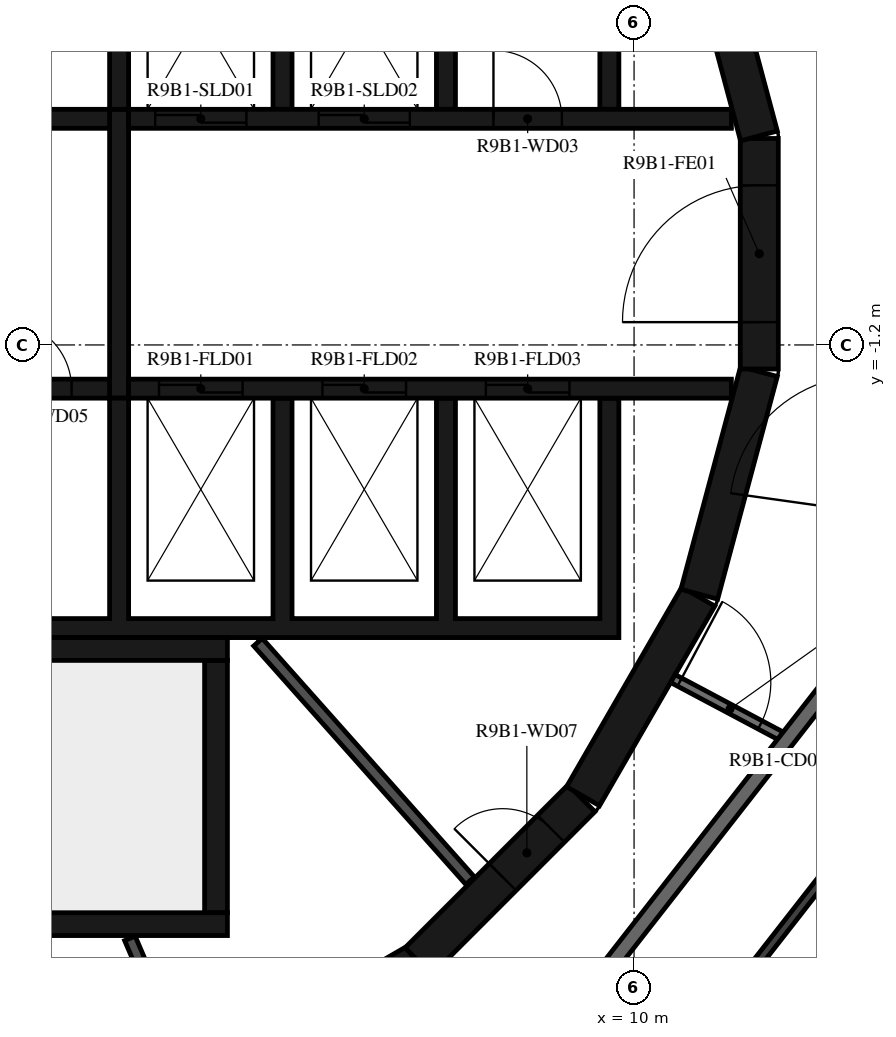
"""IFC4 building model, lengths in metres.
Left out: names, types, materials, properties, quantities, classifications, styles, units other than length and angle.
Written with IfcOpenShell. Run it as: python <this file> out.ifc"""

import sys

from ifc_helpers import new_model, si_unit, direction, frame, frame_2d, origin, place, context, subcontext, project, spatial, polyline, rectangle, outline, extrude, element, fill, save


model = new_model("IFC4")
c1 = context("Model", 3, precision=1e-05, world=origin(), true_north=direction((0.0, 1.0)))
c2 = subcontext(c1, "Body", "Model", "MODEL_VIEW")
j1 = project(units=[si_unit("LENGTHUNIT", "METRE"), si_unit("PLANEANGLEUNIT", "RADIAN")], contexts=[c1])
p1 = place(None, origin())
s1 = spatial("IfcSite", under=j1, at=p1, CompositionType="ELEMENT")
p2 = place(p1, origin())
s2 = spatial("IfcBuilding", under=s1, at=p2, CompositionType="ELEMENT")
p3 = place(p2, frame((0.0, 0.0, 343.5)))
s3 = spatial("IfcBuildingStorey", under=s2, at=p3, CompositionType="ELEMENT", Elevation=343.5)
p4 = place(p3, frame((12.221, -11.578, 0.0), z_axis=(0.0, 0.0, 1.0), x_axis=(0.615666248856, 0.788007024093, 0.0)))
e1 = element("IfcWall", 1, at=p4, inside=s3, PredefinedType="STANDARD", context=c2, shape_type="SweptSolid", body=[
    extrude(rectangle(XDim=3.2, YDim=0.16, at=frame_2d((1.6, 0.0))), origin(), (0.0, 0.0, 1.0), 3.12),
])
p5 = place(p4, frame((0.4, 0.0, 0.0)))
e2 = element("IfcOpeningElement", 2, at=p5, cuts=e1, PredefinedType="OPENING", context=c2, shape_type="SweptSolid", body=[
    extrude(rectangle(XDim=2.4, YDim=2.4, at=frame_2d((1.2, 1.2))), frame((0.0, 0.09, 0.0), z_axis=(0.0, -1.0, 0.0), x_axis=(1.0, 0.0, 0.0)), (0.0, 0.0, 1.0), 0.18),
])
p6 = place(p3, frame((4.51, -10.845, 0.0), z_axis=(0.0, 0.0, 1.0), x_axis=(0.865975092491, 0.500087131594, 0.0)))
e3 = element("IfcWall", 3, at=p6, inside=s3, PredefinedType="SHEAR", context=c2, shape_type="SweptSolid", body=[
    extrude(rectangle(XDim=3.033, YDim=0.5, at=frame_2d((1.516, 0.0))), origin(), (0.0, 0.0, 1.0), 3.12),
])
p7 = place(p6, frame((1.066, 0.0, 0.0)))
e4 = element("IfcOpeningElement", 4, at=p7, cuts=e3, PredefinedType="OPENING", context=c2, shape_type="SweptSolid", body=[
    extrude(rectangle(XDim=0.9, YDim=2.1, at=frame_2d((0.45, 1.05))), frame((0.0, 0.26, 0.0), z_axis=(0.0, -1.0, 0.0), x_axis=(1.0, 0.0, 0.0)), (0.0, 0.0, 1.0), 0.52),
])
p8 = place(p3, frame((7.164, -9.308, 0.0), z_axis=(0.0, 0.0, 1.0), x_axis=(0.707106781187, 0.707106781187, 0.0)))
e5 = element("IfcWall", 5, at=p8, inside=s3, PredefinedType="SHEAR", context=c2, shape_type="SweptSolid", body=[
    extrude(rectangle(XDim=3.032, YDim=0.5, at=frame_2d((1.516, 0.0))), origin(), (0.0, 0.0, 1.0), 3.12),
])
p9 = place(p8, frame((1.566, 0.0, 0.0)))
e6 = element("IfcOpeningElement", 6, at=p9, cuts=e5, PredefinedType="OPENING", context=c2, shape_type="SweptSolid", body=[
    extrude(rectangle(XDim=0.9, YDim=2.1, at=frame_2d((0.45, 1.05))), frame((0.0, 0.26, 0.0), z_axis=(0.0, -1.0, 0.0), x_axis=(1.0, 0.0, 0.0)), (0.0, 0.0, 1.0), 0.52),
])
for number, where, z_axis, x_axis in (
    (7, (9.329, -7.137, 0.0), (0.0, 0.0, 1.0), (0.5, 0.866, 0.0)),
    (8, (10.858, -4.479, 0.0), (0.0, 0.0, 1.0), (0.259, 0.966, 0.0)),
):
    element("IfcWall", number, at=place(p3, frame(where, z_axis=z_axis, x_axis=x_axis)), inside=s3, PredefinedType="SHEAR", context=c2, shape_type="SweptSolid", body=[
        extrude(rectangle(XDim=3.033, YDim=0.5, at=frame_2d((1.516, 0.0))), origin(), (0.0, 0.0, 1.0), 3.12),
    ])
p10 = place(p3, frame((11.647, -1.516, 0.0), z_axis=(0.0, 0.0, 1.0), x_axis=(0.0, 1.0, 0.0)))
e9 = element("IfcWall", 9, at=p10, inside=s3, PredefinedType="SHEAR", context=c2, shape_type="SweptSolid", body=[
    extrude(rectangle(XDim=3.033, YDim=0.5, at=frame_2d((1.516, 0.0))), origin(), (0.0, 0.0, 1.0), 3.12),
])
p11 = place(p10, frame((0.616, 0.0, 0.0)))
e10 = element("IfcOpeningElement", 10, at=p11, cuts=e9, PredefinedType="OPENING", context=c2, shape_type="SweptSolid", body=[
    extrude(rectangle(XDim=1.8, YDim=2.1, at=frame_2d((0.9, 1.05))), frame((0.0, 0.26, 0.0), z_axis=(0.0, -1.0, 0.0), x_axis=(1.0, 0.0, 0.0)), (0.0, 0.0, 1.0), 0.52),
])
p12 = place(p3, frame((11.643, 1.55, 0.0), z_axis=(0.0, 0.0, 1.0), x_axis=(-0.258734743916, 0.965948410781, 0.0)))
e11 = element("IfcWall", 11, at=p12, inside=s3, PredefinedType="SHEAR", context=c2, shape_type="SweptSolid", body=[
    extrude(rectangle(XDim=3.033, YDim=0.5, at=frame_2d((1.516, 0.0))), origin(), (0.0, 0.0, 1.0), 3.12),
])
p13 = place(p3, frame((-2.4, -5.2, 0.0), z_axis=(0.0, 0.0, 1.0), x_axis=(1.0, 0.0, 0.0)))
e12 = element("IfcWall", 12, at=p13, inside=s3, PredefinedType="SHEAR", context=c2, shape_type="SweptSolid", body=[
    extrude(rectangle(XDim=7.05, YDim=0.3, at=frame_2d((3.525, 0.0))), origin(), (0.0, 0.0, 1.0), 3.12),
])
p14 = place(p3, frame((4.5, -8.67, 0.0), z_axis=(0.0, 0.0, 1.0), x_axis=(0.0, 1.0, 0.0)))
e13 = element("IfcWall", 13, at=p14, inside=s3, PredefinedType="SHEAR", context=c2, shape_type="SweptSolid", body=[
    extrude(rectangle(XDim=3.32, YDim=0.3, at=frame_2d((1.66, 0.0))), origin(), (0.0, 0.0, 1.0), 3.12),
])
p15 = place(p3, frame((0.1, -8.82, 0.0), z_axis=(0.0, 0.0, 1.0), x_axis=(1.0, 0.0, 0.0)))
e14 = element("IfcWall", 14, at=p15, inside=s3, PredefinedType="SHEAR", context=c2, shape_type="SweptSolid", body=[
    extrude(rectangle(XDim=4.55, YDim=0.3, at=frame_2d((2.275, 0.0))), origin(), (0.0, 0.0, 1.0), 3.12),
])
p16 = place(p3, origin())
e15 = element("IfcWall", 15, at=p16, inside=s3, PredefinedType="SHEAR", context=c2, shape_type="SweptSolid", body=[
    extrude(outline(polyline([(-9.8, 1.9), (-9.55, 1.9), (-9.55, 4.8), (-1.2, 4.8), (-1.2, 1.9), (-0.95, 1.9), (-0.95, 4.8), (3.1, 4.8), (3.1, 1.9), (3.35, 1.9), (3.35, 4.8), (5.25, 4.8), (5.25, 1.9), (5.5, 1.9), (5.5, 4.8), (7.4, 4.8), (7.4, 1.9), (7.65, 1.9), (7.65, 4.8), (9.55, 4.8), (9.55, 1.9), (9.8, 1.9), (9.8, 4.8), (9.8, 5.05), (-9.8, 5.05), (-9.8, 4.8), (-9.8, 1.9)])), origin(), (0.0, 0.0, 1.0), 3.12),
])
p17 = place(p3, origin())
e16 = element("IfcWall", 16, at=p17, inside=s3, PredefinedType="SHEAR", context=c2, shape_type="SweptSolid", body=[
    extrude(outline(polyline([(9.8, -5.05), (9.8, -4.8), (9.8, -1.9), (9.55, -1.9), (9.55, -4.8), (7.65, -4.8), (7.65, -1.9), (7.4, -1.9), (7.4, -4.8), (5.5, -4.8), (5.5, -1.9), (5.25, -1.9), (5.25, -4.8), (3.35, -4.8), (3.35, -1.9), (3.1, -1.9), (3.1, -4.8), (1.2, -4.8), (1.2, -1.9), (0.95, -1.9), (0.95, -4.8), (-0.95, -4.8), (-0.95, -1.9), (-1.2, -1.9), (-1.2, -4.8), (-3.1, -4.8), (-3.1, -1.9), (-3.35, -1.9), (-3.35, -4.8), (-5.25, -4.8), (-5.25, -1.9), (-5.5, -1.9), (-5.5, -4.8), (-9.55, -4.8), (-9.55, -1.9), (-9.8, -1.9), (-9.8, -4.8), (-9.8, -5.05), (9.8, -5.05)])), origin(), (0.0, 0.0, 1.0), 3.12),
])
p18 = place(p3, frame((-11.28, 1.775, 0.0), z_axis=(0.0, 0.0, 1.0), x_axis=(1.0, 0.0, 0.0)))
e17 = element("IfcWall", 17, at=p18, inside=s3, PredefinedType="SHEAR", context=c2, shape_type="SweptSolid", body=[
    extrude(rectangle(XDim=14.38, YDim=0.25, at=frame_2d((7.19, 0.0))), origin(), (0.0, 0.0, 1.0), 3.12),
])
p19 = place(p18, frame((5.455, 0.0, 0.0)))
e18 = element("IfcOpeningElement", 18, at=p19, cuts=e17, PredefinedType="OPENING", context=c2, shape_type="SweptSolid", body=[
    extrude(rectangle(XDim=0.9, YDim=2.1, at=frame_2d((0.45, 1.05))), frame((0.0, 0.135, 0.0), z_axis=(0.0, -1.0, 0.0), x_axis=(1.0, 0.0, 0.0)), (0.0, 0.0, 1.0), 0.27),
])
p20 = place(p18, frame((11.905, 0.0, 0.0)))
e19 = element("IfcOpeningElement", 19, at=p20, cuts=e17, PredefinedType="OPENING", context=c2, shape_type="SweptSolid", body=[
    extrude(rectangle(XDim=0.9, YDim=2.1, at=frame_2d((0.45, 1.05))), frame((0.0, 0.135, 0.0), z_axis=(0.0, -1.0, 0.0), x_axis=(1.0, 0.0, 0.0)), (0.0, 0.0, 1.0), 0.27),
])
p21 = place(p3, frame((3.35, 1.775, 0.0), z_axis=(0.0, 0.0, 1.0), x_axis=(1.0, 0.0, 0.0)))
e20 = element("IfcWall", 20, at=p21, inside=s3, PredefinedType="SHEAR", context=c2, shape_type="SweptSolid", body=[
    extrude(rectangle(XDim=7.93, YDim=0.25, at=frame_2d((3.965, 0.0))), origin(), (0.0, 0.0, 1.0), 3.12),
])
p22 = place(p21, frame((0.35, 0.0, 0.0)))
e21 = element("IfcOpeningElement", 21, at=p22, cuts=e20, PredefinedType="OPENING", context=c2, shape_type="SweptSolid", body=[
    extrude(rectangle(XDim=1.2, YDim=2.4, at=frame_2d((0.6, 1.2))), frame((0.0, 0.135, 0.0), z_axis=(0.0, -1.0, 0.0), x_axis=(1.0, 0.0, 0.0)), (0.0, 0.0, 1.0), 0.27),
])
p23 = place(p21, frame((2.5, 0.0, 0.0)))
e22 = element("IfcOpeningElement", 22, at=p23, cuts=e20, PredefinedType="OPENING", context=c2, shape_type="SweptSolid", body=[
    extrude(rectangle(XDim=1.2, YDim=2.4, at=frame_2d((0.6, 1.2))), frame((0.0, 0.135, 0.0), z_axis=(0.0, -1.0, 0.0), x_axis=(1.0, 0.0, 0.0)), (0.0, 0.0, 1.0), 0.27),
])
p24 = place(p21, frame((4.8, 0.0, 0.0)))
e23 = element("IfcOpeningElement", 23, at=p24, cuts=e20, PredefinedType="OPENING", context=c2, shape_type="SweptSolid", body=[
    extrude(rectangle(XDim=0.9, YDim=2.1, at=frame_2d((0.45, 1.05))), frame((0.0, 0.135, 0.0), z_axis=(0.0, -1.0, 0.0), x_axis=(1.0, 0.0, 0.0)), (0.0, 0.0, 1.0), 0.27),
])
p25 = place(p3, frame((-11.28, -1.775, 0.0), z_axis=(0.0, 0.0, 1.0), x_axis=(1.0, 0.0, 0.0)))
e24 = element("IfcWall", 24, at=p25, inside=s3, PredefinedType="SHEAR", context=c2, shape_type="SweptSolid", body=[
    extrude(rectangle(XDim=14.38, YDim=0.25, at=frame_2d((7.19, 0.0))), origin(), (0.0, 0.0, 1.0), 3.12),
])
p26 = place(p25, frame((6.43, 0.0, 0.0)))
e25 = element("IfcOpeningElement", 25, at=p26, cuts=e24, PredefinedType="OPENING", context=c2, shape_type="SweptSolid", body=[
    extrude(rectangle(XDim=1.1, YDim=2.1, at=frame_2d((0.55, 1.05))), frame((0.0, 0.135, 0.0), z_axis=(0.0, -1.0, 0.0), x_axis=(1.0, 0.0, 0.0)), (0.0, 0.0, 1.0), 0.27),
])
p27 = place(p25, frame((8.58, 0.0, 0.0)))
e26 = element("IfcOpeningElement", 26, at=p27, cuts=e24, PredefinedType="OPENING", context=c2, shape_type="SweptSolid", body=[
    extrude(rectangle(XDim=1.1, YDim=2.1, at=frame_2d((0.55, 1.05))), frame((0.0, 0.135, 0.0), z_axis=(0.0, -1.0, 0.0), x_axis=(1.0, 0.0, 0.0)), (0.0, 0.0, 1.0), 0.27),
])
p28 = place(p25, frame((10.73, 0.0, 0.0)))
e27 = element("IfcOpeningElement", 27, at=p28, cuts=e24, PredefinedType="OPENING", context=c2, shape_type="SweptSolid", body=[
    extrude(rectangle(XDim=1.1, YDim=2.1, at=frame_2d((0.55, 1.05))), frame((0.0, 0.135, 0.0), z_axis=(0.0, -1.0, 0.0), x_axis=(1.0, 0.0, 0.0)), (0.0, 0.0, 1.0), 0.27),
])
p29 = place(p25, frame((3.305, 0.0, 0.0)))
e28 = element("IfcOpeningElement", 28, at=p29, cuts=e24, PredefinedType="OPENING", context=c2, shape_type="SweptSolid", body=[
    extrude(rectangle(XDim=0.9, YDim=2.1, at=frame_2d((0.45, 1.05))), frame((0.0, 0.135, 0.0), z_axis=(0.0, -1.0, 0.0), x_axis=(1.0, 0.0, 0.0)), (0.0, 0.0, 1.0), 0.27),
])
p30 = place(p25, frame((12.98, 0.0, 0.0)))
e29 = element("IfcOpeningElement", 29, at=p30, cuts=e24, PredefinedType="OPENING", context=c2, shape_type="SweptSolid", body=[
    extrude(rectangle(XDim=0.9, YDim=2.1, at=frame_2d((0.45, 1.05))), frame((0.0, 0.135, 0.0), z_axis=(0.0, -1.0, 0.0), x_axis=(1.0, 0.0, 0.0)), (0.0, 0.0, 1.0), 0.27),
])
p31 = place(p3, frame((3.35, -1.775, 0.0), z_axis=(0.0, 0.0, 1.0), x_axis=(1.0, 0.0, 0.0)))
e30 = element("IfcWall", 30, at=p31, inside=s3, PredefinedType="SHEAR", context=c2, shape_type="SweptSolid", body=[
    extrude(rectangle(XDim=7.93, YDim=0.25, at=frame_2d((3.965, 0.0))), origin(), (0.0, 0.0, 1.0), 3.12),
])
p32 = place(p31, frame((0.4, 0.0, 0.0)))
e31 = element("IfcOpeningElement", 31, at=p32, cuts=e30, PredefinedType="OPENING", context=c2, shape_type="SweptSolid", body=[
    extrude(rectangle(XDim=1.1, YDim=2.4, at=frame_2d((0.55, 1.2))), frame((0.0, 0.135, 0.0), z_axis=(0.0, -1.0, 0.0), x_axis=(1.0, 0.0, 0.0)), (0.0, 0.0, 1.0), 0.27),
])
p33 = place(p31, frame((2.55, 0.0, 0.0)))
e32 = element("IfcOpeningElement", 32, at=p33, cuts=e30, PredefinedType="OPENING", context=c2, shape_type="SweptSolid", body=[
    extrude(rectangle(XDim=1.1, YDim=2.4, at=frame_2d((0.55, 1.2))), frame((0.0, 0.135, 0.0), z_axis=(0.0, -1.0, 0.0), x_axis=(1.0, 0.0, 0.0)), (0.0, 0.0, 1.0), 0.27),
])
p34 = place(p31, frame((4.7, 0.0, 0.0)))
e33 = element("IfcOpeningElement", 33, at=p34, cuts=e30, PredefinedType="OPENING", context=c2, shape_type="SweptSolid", body=[
    extrude(rectangle(XDim=1.1, YDim=2.4, at=frame_2d((0.55, 1.2))), frame((0.0, 0.135, 0.0), z_axis=(0.0, -1.0, 0.0), x_axis=(1.0, 0.0, 0.0)), (0.0, 0.0, 1.0), 0.27),
])
p35 = place(p3, frame((3.225, -1.9, 0.0), z_axis=(0.0, 0.0, 1.0), x_axis=(0.0, 1.0, 0.0)))
e34 = element("IfcWall", 34, at=p35, inside=s3, PredefinedType="SHEAR", context=c2, shape_type="SweptSolid", body=[
    extrude(rectangle(XDim=3.8, YDim=0.25, at=frame_2d((1.9, 0.0))), origin(), (0.0, 0.0, 1.0), 3.12),
])
p36 = place(p3, frame((7.842, -8.248, 0.0), z_axis=(0.0, 0.0, 1.0), x_axis=(-0.66446128181, 0.747322691329, 0.0)))
e35 = element("IfcWall", 35, at=p36, inside=s3, PredefinedType="PARTITIONING", context=c2, shape_type="SweptSolid", body=[
    extrude(rectangle(XDim=4.198, YDim=0.15, at=frame_2d((2.099, 0.0))), origin(), (0.0, 0.0, 1.0), 3.12),
])
p37 = place(p3, frame((3.367, -9.007, 0.0), z_axis=(0.0, 0.0, 1.0), x_axis=(0.394387482265, -0.918944238696, 0.0)))
e36 = element("IfcWall", 36, at=p37, inside=s3, PredefinedType="PARTITIONING", context=c2, shape_type="SweptSolid", body=[
    extrude(rectangle(XDim=1.825, YDim=0.15, at=frame_2d((0.913, 0.0))), origin(), (0.0, 0.0, 1.0), 3.12),
])
p38 = place(p3, frame((10.511, -5.589, 0.0), z_axis=(0.0, 0.0, 1.0), x_axis=(0.882959677414, -0.469448834337, 0.0)))
e37 = element("IfcWall", 37, at=p38, inside=s3, PredefinedType="PARTITIONING", context=c2, shape_type="SweptSolid", body=[
    extrude(rectangle(XDim=1.702, YDim=0.12, at=frame_2d((0.851, 0.0))), origin(), (0.0, 0.0, 1.0), 3.12),
])
p39 = place(p38, frame((0.1, 0.0, 0.0)))
e38 = element("IfcOpeningElement", 38, at=p39, cuts=e37, PredefinedType="OPENING", context=c2, shape_type="SweptSolid", body=[
    extrude(rectangle(XDim=1.2, YDim=2.1, at=frame_2d((0.6, 1.05))), frame((0.0, 0.07, 0.0), z_axis=(0.0, -1.0, 0.0), x_axis=(1.0, 0.0, 0.0)), (0.0, 0.0, 1.0), 0.14),
])
p40 = place(p3, frame((13.769, 1.691, 0.0), z_axis=(0.0, 0.0, 1.0), x_axis=(-0.374618189599, 0.92717916932, 0.0)))
e39 = element("IfcWall", 39, at=p40, inside=s3, PredefinedType="STANDARD", context=c2, shape_type="SweptSolid", body=[
    extrude(rectangle(XDim=7.181, YDim=0.2, at=frame_2d((3.591, 0.0))), origin(), (0.0, 0.0, 1.0), 3.12),
])
p41 = place(p40, frame((2.371, 0.0, 0.0)))
e40 = element("IfcOpeningElement", 40, at=p41, cuts=e39, PredefinedType="OPENING", context=c2, shape_type="SweptSolid", body=[
    extrude(rectangle(XDim=1.0, YDim=2.1, at=frame_2d((0.5, 1.05))), frame((0.0, 0.11, 0.0), z_axis=(0.0, -1.0, 0.0), x_axis=(1.0, 0.0, 0.0)), (0.0, 0.0, 1.0), 0.22),
])
p42 = place(p3, frame((8.349, -11.079, 0.0), z_axis=(0.0, 0.0, 1.0), x_axis=(0.615669112324, 0.78800478687, 0.0)))
e41 = element("IfcWall", 41, at=p42, inside=s3, PredefinedType="STANDARD", context=c2, shape_type="SweptSolid", body=[
    extrude(rectangle(XDim=7.181, YDim=0.2, at=frame_2d((3.591, 0.0))), origin(), (0.0, 0.0, 1.0), 3.12),
])
p43 = place(p3, frame((9.351, -12.233, 0.0), z_axis=(0.0, 0.0, 1.0), x_axis=(0.615678207218, 0.787997680933, 0.0)))
e42 = element("IfcWall", 42, at=p43, inside=s3, PredefinedType="PARTITIONING", context=c2, shape_type="SweptSolid", body=[
    extrude(rectangle(XDim=7.765, YDim=0.12, at=frame_2d((3.883, 0.0))), origin(), (0.0, 0.0, 1.0), 3.12),
])
p44 = place(p43, frame((0.2, 0.0, 0.0)))
e43 = element("IfcOpeningElement", 43, at=p44, cuts=e42, PredefinedType="OPENING", context=c2, shape_type="SweptSolid", body=[
    extrude(rectangle(XDim=0.9, YDim=2.1, at=frame_2d((0.45, 1.05))), frame((0.0, 0.07, 0.0), z_axis=(0.0, -1.0, 0.0), x_axis=(1.0, 0.0, 0.0)), (0.0, 0.0, 1.0), 0.14),
])
p45 = place(p11, origin())
e44 = element("IfcDoor", 44, at=p45, inside=s3, OperationType="DOUBLE_DOOR_SINGLE_SWING", PredefinedType="DOOR", context=c2, shape_type="SweptSolid", body=[
    extrude(rectangle(XDim=1.8, YDim=2.1, at=frame_2d((0.9, 1.05))), frame((0.0, 0.025, 0.0), z_axis=(0.0, -1.0, 0.0), x_axis=(1.0, 0.0, 0.0)), (0.0, 0.0, 1.0), 0.05),
])
fill(e10, e44)
p46 = place(p22, origin())
e45 = element("IfcDoor", 45, at=p46, inside=s3, OperationType="DOUBLE_DOOR_SLIDING", PredefinedType="DOOR", context=c2, shape_type="SweptSolid", body=[
    extrude(rectangle(XDim=1.2, YDim=2.4, at=frame_2d((0.6, 1.2))), frame((0.0, 0.025, 0.0), z_axis=(0.0, -1.0, 0.0), x_axis=(1.0, 0.0, 0.0)), (0.0, 0.0, 1.0), 0.05),
])
fill(e21, e45)
p47 = place(p23, origin())
e46 = element("IfcDoor", 46, at=p47, inside=s3, OperationType="DOUBLE_DOOR_SLIDING", PredefinedType="DOOR", context=c2, shape_type="SweptSolid", body=[
    extrude(rectangle(XDim=1.2, YDim=2.4, at=frame_2d((0.6, 1.2))), frame((0.0, 0.025, 0.0), z_axis=(0.0, -1.0, 0.0), x_axis=(1.0, 0.0, 0.0)), (0.0, 0.0, 1.0), 0.05),
])
fill(e22, e46)
p48 = place(p32, origin())
e47 = element("IfcDoor", 47, at=p48, inside=s3, OperationType="DOUBLE_DOOR_SLIDING", PredefinedType="DOOR", context=c2, shape_type="SweptSolid", body=[
    extrude(rectangle(XDim=1.1, YDim=2.4, at=frame_2d((0.55, 1.2))), frame((0.0, 0.025, 0.0), z_axis=(0.0, -1.0, 0.0), x_axis=(1.0, 0.0, 0.0)), (0.0, 0.0, 1.0), 0.05),
])
fill(e31, e47)
p49 = place(p33, origin())
e48 = element("IfcDoor", 48, at=p49, inside=s3, OperationType="DOUBLE_DOOR_SLIDING", PredefinedType="DOOR", context=c2, shape_type="SweptSolid", body=[
    extrude(rectangle(XDim=1.1, YDim=2.4, at=frame_2d((0.55, 1.2))), frame((0.0, 0.025, 0.0), z_axis=(0.0, -1.0, 0.0), x_axis=(1.0, 0.0, 0.0)), (0.0, 0.0, 1.0), 0.05),
])
fill(e32, e48)
p50 = place(p34, origin())
e49 = element("IfcDoor", 49, at=p50, inside=s3, OperationType="DOUBLE_DOOR_SLIDING", PredefinedType="DOOR", context=c2, shape_type="SweptSolid", body=[
    extrude(rectangle(XDim=1.1, YDim=2.4, at=frame_2d((0.55, 1.2))), frame((0.0, 0.025, 0.0), z_axis=(0.0, -1.0, 0.0), x_axis=(1.0, 0.0, 0.0)), (0.0, 0.0, 1.0), 0.05),
])
fill(e33, e49)
p51 = place(p24, origin())
e50 = element("IfcDoor", 50, at=p51, inside=s3, OperationType="SINGLE_SWING_LEFT", PredefinedType="DOOR", context=c2, shape_type="SweptSolid", body=[
    extrude(rectangle(XDim=0.9, YDim=2.1, at=frame_2d((0.45, 1.05))), frame((0.0, 0.025, 0.0), z_axis=(0.0, -1.0, 0.0), x_axis=(1.0, 0.0, 0.0)), (0.0, 0.0, 1.0), 0.05),
])
fill(e23, e50)
p52 = place(p30, origin())
e51 = element("IfcDoor", 51, at=p52, inside=s3, OperationType="SINGLE_SWING_LEFT", PredefinedType="DOOR", context=c2, shape_type="SweptSolid", body=[
    extrude(rectangle(XDim=0.9, YDim=2.1, at=frame_2d((0.45, 1.05))), frame((0.0, 0.025, 0.0), z_axis=(0.0, -1.0, 0.0), x_axis=(1.0, 0.0, 0.0)), (0.0, 0.0, 1.0), 0.05),
])
fill(e29, e51)
p53 = place(p9, origin())
e52 = element("IfcDoor", 52, at=p53, inside=s3, OperationType="SINGLE_SWING_LEFT", PredefinedType="DOOR", context=c2, shape_type="SweptSolid", body=[
    extrude(rectangle(XDim=0.9, YDim=2.1, at=frame_2d((0.45, 1.05))), frame((0.0, 0.025, 0.0), z_axis=(0.0, -1.0, 0.0), x_axis=(1.0, 0.0, 0.0)), (0.0, 0.0, 1.0), 0.05),
])
fill(e6, e52)
p54 = place(p39, origin())
e53 = element("IfcDoor", 53, at=p54, inside=s3, OperationType="DOUBLE_DOOR_SINGLE_SWING", PredefinedType="DOOR", context=c2, shape_type="SweptSolid", body=[
    extrude(rectangle(XDim=1.2, YDim=2.1, at=frame_2d((0.6, 1.05))), frame((0.0, 0.025, 0.0), z_axis=(0.0, -1.0, 0.0), x_axis=(1.0, 0.0, 0.0)), (0.0, 0.0, 1.0), 0.05),
])
fill(e38, e53)
save(model, sys.argv[1])
